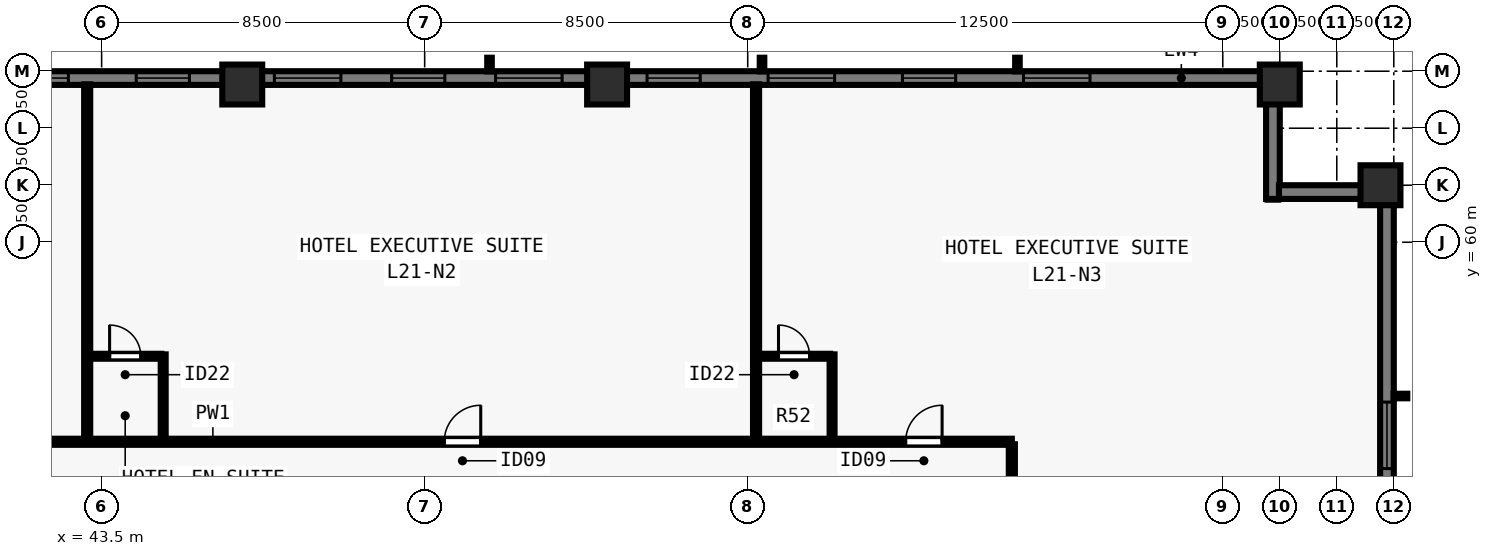
"""IFC4 building model, lengths in metres.
Left out: names, types, materials, properties, quantities, classifications, styles, units other than length and angle.
Written with IfcOpenShell. Run it as: python <this file> out.ifc"""

import sys

from ifc_helpers import new_model, si_unit, direction, frame, frame_2d, origin, origin_2d, place, context, subcontext, project, spatial, rectangle, extrude, element, fill, save


model = new_model("IFC4")
c1 = context("Model", 3, precision=1e-05, world=origin(), true_north=direction((0.0, 1.0)))
c2 = subcontext(c1, "Body", "Model", "MODEL_VIEW")
j1 = project(units=[si_unit("LENGTHUNIT", "METRE"), si_unit("PLANEANGLEUNIT", "RADIAN")], contexts=[c1])
p1 = place(None, origin())
s1 = spatial("IfcSite", under=j1, at=p1, CompositionType="ELEMENT")
p2 = place(p1, origin())
s2 = spatial("IfcBuilding", under=s1, at=p2, CompositionType="ELEMENT")
p3 = place(p2, frame((0.0, 0.0, 79.5)))
s3 = spatial("IfcBuildingStorey", under=s2, at=p3, CompositionType="ELEMENT", Elevation=79.5)
for number, where, z_axis, x_axis in (
    (1, (77.15, 61.5, 0.0), (0.0, 0.0, 1.0), (0.0, 1.0, 0.0)),
    (2, (74.5, 64.15, 0.0), (0.0, 0.0, 1.0), (1.0, 0.0, 0.0)),
    (3, (56.8, 64.15, 0.0), (0.0, 0.0, 1.0), (1.0, 0.0, 0.0)),
    (4, (47.2, 64.15, 0.0), (0.0, 0.0, 1.0), (1.0, 0.0, 0.0)),
):
    element("IfcColumn", number, at=place(p3, frame(where, z_axis=z_axis, x_axis=x_axis)), inside=s3, PredefinedType="COLUMN", context=c2, shape_type="SweptSolid", body=[
        extrude(rectangle(XDim=1.05, YDim=1.05, at=origin_2d()), origin(), (0.0, 0.0, 1.0), 3.5),
    ])
p4 = place(p3, frame((29.5, 64.32, 0.0), z_axis=(0.0, 0.0, 1.0), x_axis=(1.0, 0.0, 0.0)))
e5 = element("IfcWall", 5, at=p4, inside=s3, PredefinedType="SOLIDWALL", context=c2, shape_type="SweptSolid", body=[
    extrude(rectangle(XDim=44.662, YDim=0.36, at=frame_2d((22.331, 0.0))), origin(), (0.0, 0.0, 1.0), 3.28),
])
p5 = place(p4, frame((4.655, 0.0, 0.8)))
e6 = element("IfcOpeningElement", 6, at=p5, cuts=e5, PredefinedType="OPENING", context=c2, shape_type="SweptSolid", body=[
    extrude(rectangle(XDim=1.75, YDim=1.544, at=frame_2d((0.875, 0.772))), frame((0.0, 0.19, 0.0), z_axis=(0.0, -1.0, 0.0), x_axis=(1.0, 0.0, 0.0)), (0.0, 0.0, 1.0), 0.38),
])
p6 = place(p4, frame((8.19, 0.0, 0.8)))
e7 = element("IfcOpeningElement", 7, at=p6, cuts=e5, PredefinedType="OPENING", context=c2, shape_type="SweptSolid", body=[
    extrude(rectangle(XDim=1.4, YDim=1.544, at=frame_2d((0.7, 0.772))), frame((0.0, 0.19, 0.0), z_axis=(0.0, -1.0, 0.0), x_axis=(1.0, 0.0, 0.0)), (0.0, 0.0, 1.0), 0.38),
])
p7 = place(p4, frame((11.375, 0.0, 0.8)))
e8 = element("IfcOpeningElement", 8, at=p7, cuts=e5, PredefinedType="OPENING", context=c2, shape_type="SweptSolid", body=[
    extrude(rectangle(XDim=1.75, YDim=1.544, at=frame_2d((0.875, 0.772))), frame((0.0, 0.19, 0.0), z_axis=(0.0, -1.0, 0.0), x_axis=(1.0, 0.0, 0.0)), (0.0, 0.0, 1.0), 0.38),
])
p8 = place(p4, frame((14.911, 0.0, 0.8)))
e9 = element("IfcOpeningElement", 9, at=p8, cuts=e5, PredefinedType="OPENING", context=c2, shape_type="SweptSolid", body=[
    extrude(rectangle(XDim=1.4, YDim=1.544, at=frame_2d((0.7, 0.772))), frame((0.0, 0.19, 0.0), z_axis=(0.0, -1.0, 0.0), x_axis=(1.0, 0.0, 0.0)), (0.0, 0.0, 1.0), 0.38),
])
p9 = place(p4, frame((18.546, 0.0, 0.8)))
e10 = element("IfcOpeningElement", 10, at=p9, cuts=e5, PredefinedType="OPENING", context=c2, shape_type="SweptSolid", body=[
    extrude(rectangle(XDim=1.75, YDim=1.544, at=frame_2d((0.875, 0.772))), frame((0.0, 0.19, 0.0), z_axis=(0.0, -1.0, 0.0), x_axis=(1.0, 0.0, 0.0)), (0.0, 0.0, 1.0), 0.38),
])
p10 = place(p4, frame((21.631, 0.0, 0.8)))
e11 = element("IfcOpeningElement", 11, at=p10, cuts=e5, PredefinedType="OPENING", context=c2, shape_type="SweptSolid", body=[
    extrude(rectangle(XDim=1.4, YDim=1.544, at=frame_2d((0.7, 0.772))), frame((0.0, 0.19, 0.0), z_axis=(0.0, -1.0, 0.0), x_axis=(1.0, 0.0, 0.0)), (0.0, 0.0, 1.0), 0.38),
])
p11 = place(p4, frame((24.366, 0.0, 0.8)))
e12 = element("IfcOpeningElement", 12, at=p11, cuts=e5, PredefinedType="OPENING", context=c2, shape_type="SweptSolid", body=[
    extrude(rectangle(XDim=1.75, YDim=1.544, at=frame_2d((0.875, 0.772))), frame((0.0, 0.19, 0.0), z_axis=(0.0, -1.0, 0.0), x_axis=(1.0, 0.0, 0.0)), (0.0, 0.0, 1.0), 0.38),
])
p12 = place(p4, frame((28.351, 0.0, 0.8)))
e13 = element("IfcOpeningElement", 13, at=p12, cuts=e5, PredefinedType="OPENING", context=c2, shape_type="SweptSolid", body=[
    extrude(rectangle(XDim=1.4, YDim=1.544, at=frame_2d((0.7, 0.772))), frame((0.0, 0.19, 0.0), z_axis=(0.0, -1.0, 0.0), x_axis=(1.0, 0.0, 0.0)), (0.0, 0.0, 1.0), 0.38),
])
p13 = place(p4, frame((31.537, 0.0, 0.8)))
e14 = element("IfcOpeningElement", 14, at=p13, cuts=e5, PredefinedType="OPENING", context=c2, shape_type="SweptSolid", body=[
    extrude(rectangle(XDim=1.75, YDim=1.544, at=frame_2d((0.875, 0.772))), frame((0.0, 0.19, 0.0), z_axis=(0.0, -1.0, 0.0), x_axis=(1.0, 0.0, 0.0)), (0.0, 0.0, 1.0), 0.38),
])
p14 = place(p4, frame((35.072, 0.0, 0.8)))
e15 = element("IfcOpeningElement", 15, at=p14, cuts=e5, PredefinedType="OPENING", context=c2, shape_type="SweptSolid", body=[
    extrude(rectangle(XDim=1.4, YDim=1.544, at=frame_2d((0.7, 0.772))), frame((0.0, 0.19, 0.0), z_axis=(0.0, -1.0, 0.0), x_axis=(1.0, 0.0, 0.0)), (0.0, 0.0, 1.0), 0.38),
])
p15 = place(p4, frame((38.257, 0.0, 0.8)))
e16 = element("IfcOpeningElement", 16, at=p15, cuts=e5, PredefinedType="OPENING", context=c2, shape_type="SweptSolid", body=[
    extrude(rectangle(XDim=1.75, YDim=1.544, at=frame_2d((0.875, 0.772))), frame((0.0, 0.19, 0.0), z_axis=(0.0, -1.0, 0.0), x_axis=(1.0, 0.0, 0.0)), (0.0, 0.0, 1.0), 0.38),
])
p16 = place(p3, frame((74.32, 64.5, 0.0), z_axis=(0.0, 0.0, 1.0), x_axis=(0.0, -1.0, 0.0)))
e17 = element("IfcWall", 17, at=p16, inside=s3, PredefinedType="SOLIDWALL", context=c2, shape_type="SweptSolid", body=[
    extrude(rectangle(XDim=3.36, YDim=0.36, at=frame_2d((1.68, 0.0))), origin(), (0.0, 0.0, 1.0), 3.28),
])
p17 = place(p3, frame((74.478, 61.32, 0.0), z_axis=(0.0, 0.0, 1.0), x_axis=(1.0, 0.0, 0.0)))
e18 = element("IfcWall", 18, at=p17, inside=s3, PredefinedType="SOLIDWALL", context=c2, shape_type="SweptSolid", body=[
    extrude(rectangle(XDim=2.684, YDim=0.36, at=frame_2d((1.342, 0.0))), origin(), (0.0, 0.0, 1.0), 3.28),
])
p18 = place(p3, frame((77.32, 61.5, 0.0), z_axis=(0.0, 0.0, 1.0), x_axis=(0.0, -1.0, 0.0)))
e19 = element("IfcWall", 19, at=p18, inside=s3, PredefinedType="SOLIDWALL", context=c2, shape_type="SweptSolid", body=[
    extrude(rectangle(XDim=10.562, YDim=0.36, at=frame_2d((5.281, 0.0))), origin(), (0.0, 0.0, 1.0), 3.28),
])
p19 = place(p18, frame((5.706, 0.0, 0.8)))
e20 = element("IfcOpeningElement", 20, at=p19, cuts=e19, PredefinedType="OPENING", context=c2, shape_type="SweptSolid", body=[
    extrude(rectangle(XDim=1.75, YDim=1.544, at=frame_2d((0.875, 0.772))), frame((0.0, 0.19, 0.0), z_axis=(0.0, -1.0, 0.0), x_axis=(1.0, 0.0, 0.0)), (0.0, 0.0, 1.0), 0.38),
])
p20 = place(p3, frame((36.55, 54.75, 0.0), z_axis=(0.0, 0.0, 1.0), x_axis=(1.0, 0.0, 0.0)))
e21 = element("IfcWall", 21, at=p20, inside=s3, PredefinedType="PARTITIONING", context=c2, shape_type="SweptSolid", body=[
    extrude(rectangle(XDim=30.9, YDim=0.16, at=frame_2d((15.45, 0.0))), origin(), (0.0, 0.0, 1.0), 3.28),
])
p21 = place(p20, frame((2.83, 0.0, 0.0)))
e22 = element("IfcOpeningElement", 22, at=p21, cuts=e21, PredefinedType="OPENING", context=c2, shape_type="SweptSolid", body=[
    extrude(rectangle(XDim=0.96, YDim=2.15, at=frame_2d((0.48, 1.075))), frame((0.0, 0.09, 0.0), z_axis=(0.0, -1.0, 0.0), x_axis=(1.0, 0.0, 0.0)), (0.0, 0.0, 1.0), 0.18),
])
p22 = place(p20, frame((15.965, 0.0, 0.0)))
e23 = element("IfcOpeningElement", 23, at=p22, cuts=e21, PredefinedType="OPENING", context=c2, shape_type="SweptSolid", body=[
    extrude(rectangle(XDim=0.96, YDim=2.15, at=frame_2d((0.48, 1.075))), frame((0.0, 0.09, 0.0), z_axis=(0.0, -1.0, 0.0), x_axis=(1.0, 0.0, 0.0)), (0.0, 0.0, 1.0), 0.18),
])
p23 = place(p20, frame((28.105, 0.0, 0.0)))
e24 = element("IfcOpeningElement", 24, at=p23, cuts=e21, PredefinedType="OPENING", context=c2, shape_type="SweptSolid", body=[
    extrude(rectangle(XDim=0.96, YDim=2.15, at=frame_2d((0.48, 1.075))), frame((0.0, 0.09, 0.0), z_axis=(0.0, -1.0, 0.0), x_axis=(1.0, 0.0, 0.0)), (0.0, 0.0, 1.0), 0.18),
])
p24 = place(p3, frame((67.45, 23.315, 0.0), z_axis=(0.0, 0.0, 1.0), x_axis=(0.0, 1.0, 0.0)))
e25 = element("IfcWall", 25, at=p24, inside=s3, PredefinedType="PARTITIONING", context=c2, shape_type="SweptSolid", body=[
    extrude(rectangle(XDim=31.37, YDim=0.16, at=frame_2d((15.685, 0.0))), origin(), (0.0, 0.0, 1.0), 3.28),
])
p25 = place(p24, frame((8.474, 0.0, 0.0)))
e26 = element("IfcOpeningElement", 26, at=p25, cuts=e25, PredefinedType="OPENING", context=c2, shape_type="SweptSolid", body=[
    extrude(rectangle(XDim=0.96, YDim=2.15, at=frame_2d((0.48, 1.075))), frame((0.0, 0.09, 0.0), z_axis=(0.0, -1.0, 0.0), x_axis=(1.0, 0.0, 0.0)), (0.0, 0.0, 1.0), 0.18),
])
p26 = place(p24, frame((23.974, 0.0, 0.0)))
e27 = element("IfcOpeningElement", 27, at=p26, cuts=e25, PredefinedType="OPENING", context=c2, shape_type="SweptSolid", body=[
    extrude(rectangle(XDim=0.96, YDim=2.15, at=frame_2d((0.48, 1.075))), frame((0.0, 0.09, 0.0), z_axis=(0.0, -1.0, 0.0), x_axis=(1.0, 0.0, 0.0)), (0.0, 0.0, 1.0), 0.18),
])
p27 = place(p3, frame((43.12, 54.815, 0.0), z_axis=(0.0, 0.0, 1.0), x_axis=(0.0, 1.0, 0.0)))
e28 = element("IfcWall", 28, at=p27, inside=s3, PredefinedType="PARTITIONING", context=c2, shape_type="SweptSolid", body=[
    extrude(rectangle(XDim=9.34, YDim=0.16, at=frame_2d((4.67, 0.0))), origin(), (0.0, 0.0, 1.0), 3.28),
])
p28 = place(p3, frame((45.12, 54.815, 0.0), z_axis=(0.0, 0.0, 1.0), x_axis=(0.0, 1.0, 0.0)))
e29 = element("IfcWall", 29, at=p28, inside=s3, PredefinedType="PLUMBINGWALL", context=c2, shape_type="SweptSolid", body=[
    extrude(rectangle(XDim=2.235, YDim=0.13, at=frame_2d((1.118, 0.0))), origin(), (0.0, 0.0, 1.0), 3.28),
])
p29 = place(p3, frame((43.185, 57.0, 0.0), z_axis=(0.0, 0.0, 1.0), x_axis=(1.0, 0.0, 0.0)))
e30 = element("IfcWall", 30, at=p29, inside=s3, PredefinedType="PLUMBINGWALL", context=c2, shape_type="SweptSolid", body=[
    extrude(rectangle(XDim=1.885, YDim=0.13, at=frame_2d((0.942, 0.0))), origin(), (0.0, 0.0, 1.0), 3.28),
])
p30 = place(p29, frame((0.525, 0.0, 0.0)))
e31 = element("IfcOpeningElement", 31, at=p30, cuts=e30, PredefinedType="OPENING", context=c2, shape_type="SweptSolid", body=[
    extrude(rectangle(XDim=0.82, YDim=2.1, at=frame_2d((0.41, 1.05))), frame((0.0, 0.075, 0.0), z_axis=(0.0, -1.0, 0.0), x_axis=(1.0, 0.0, 0.0)), (0.0, 0.0, 1.0), 0.15),
])
p31 = place(p3, frame((60.72, 54.815, 0.0), z_axis=(0.0, 0.0, 1.0), x_axis=(0.0, 1.0, 0.0)))
e32 = element("IfcWall", 32, at=p31, inside=s3, PredefinedType="PARTITIONING", context=c2, shape_type="SweptSolid", body=[
    extrude(rectangle(XDim=9.34, YDim=0.16, at=frame_2d((4.67, 0.0))), origin(), (0.0, 0.0, 1.0), 3.28),
])
p32 = place(p3, frame((62.72, 54.815, 0.0), z_axis=(0.0, 0.0, 1.0), x_axis=(0.0, 1.0, 0.0)))
e33 = element("IfcWall", 33, at=p32, inside=s3, PredefinedType="PLUMBINGWALL", context=c2, shape_type="SweptSolid", body=[
    extrude(rectangle(XDim=2.235, YDim=0.13, at=frame_2d((1.118, 0.0))), origin(), (0.0, 0.0, 1.0), 3.28),
])
p33 = place(p3, frame((60.785, 57.0, 0.0), z_axis=(0.0, 0.0, 1.0), x_axis=(1.0, 0.0, 0.0)))
e34 = element("IfcWall", 34, at=p33, inside=s3, PredefinedType="PLUMBINGWALL", context=c2, shape_type="SweptSolid", body=[
    extrude(rectangle(XDim=1.885, YDim=0.13, at=frame_2d((0.942, 0.0))), origin(), (0.0, 0.0, 1.0), 3.28),
])
p34 = place(p33, frame((0.525, 0.0, 0.0)))
e35 = element("IfcOpeningElement", 35, at=p34, cuts=e34, PredefinedType="OPENING", context=c2, shape_type="SweptSolid", body=[
    extrude(rectangle(XDim=0.82, YDim=2.1, at=frame_2d((0.41, 1.05))), frame((0.0, 0.075, 0.0), z_axis=(0.0, -1.0, 0.0), x_axis=(1.0, 0.0, 0.0)), (0.0, 0.0, 1.0), 0.15),
])
p35 = place(p7, origin())
e36 = element("IfcWindow", 36, at=p35, inside=s3, PartitioningType="SINGLE_PANEL", PredefinedType="WINDOW", context=c2, shape_type="SweptSolid", body=[
    extrude(rectangle(XDim=1.75, YDim=1.544, at=frame_2d((0.875, 0.772))), frame((0.0, -0.05, 0.0), z_axis=(0.0, -1.0, 0.0), x_axis=(1.0, 0.0, 0.0)), (0.0, 0.0, 1.0), 0.06),
])
fill(e8, e36)
p36 = place(p8, origin())
e37 = element("IfcWindow", 37, at=p36, inside=s3, PartitioningType="SINGLE_PANEL", PredefinedType="WINDOW", context=c2, shape_type="SweptSolid", body=[
    extrude(rectangle(XDim=1.4, YDim=1.544, at=frame_2d((0.7, 0.772))), frame((0.0, -0.05, 0.0), z_axis=(0.0, -1.0, 0.0), x_axis=(1.0, 0.0, 0.0)), (0.0, 0.0, 1.0), 0.06),
])
fill(e9, e37)
p37 = place(p9, origin())
e38 = element("IfcWindow", 38, at=p37, inside=s3, PartitioningType="SINGLE_PANEL", PredefinedType="WINDOW", context=c2, shape_type="SweptSolid", body=[
    extrude(rectangle(XDim=1.75, YDim=1.544, at=frame_2d((0.875, 0.772))), frame((0.0, -0.05, 0.0), z_axis=(0.0, -1.0, 0.0), x_axis=(1.0, 0.0, 0.0)), (0.0, 0.0, 1.0), 0.06),
])
fill(e10, e38)
p38 = place(p10, origin())
e39 = element("IfcWindow", 39, at=p38, inside=s3, PartitioningType="SINGLE_PANEL", PredefinedType="WINDOW", context=c2, shape_type="SweptSolid", body=[
    extrude(rectangle(XDim=1.4, YDim=1.544, at=frame_2d((0.7, 0.772))), frame((0.0, -0.05, 0.0), z_axis=(0.0, -1.0, 0.0), x_axis=(1.0, 0.0, 0.0)), (0.0, 0.0, 1.0), 0.06),
])
fill(e11, e39)
p39 = place(p11, origin())
e40 = element("IfcWindow", 40, at=p39, inside=s3, PartitioningType="SINGLE_PANEL", PredefinedType="WINDOW", context=c2, shape_type="SweptSolid", body=[
    extrude(rectangle(XDim=1.75, YDim=1.544, at=frame_2d((0.875, 0.772))), frame((0.0, -0.05, 0.0), z_axis=(0.0, -1.0, 0.0), x_axis=(1.0, 0.0, 0.0)), (0.0, 0.0, 1.0), 0.06),
])
fill(e12, e40)
p40 = place(p12, origin())
e41 = element("IfcWindow", 41, at=p40, inside=s3, PartitioningType="SINGLE_PANEL", PredefinedType="WINDOW", context=c2, shape_type="SweptSolid", body=[
    extrude(rectangle(XDim=1.4, YDim=1.544, at=frame_2d((0.7, 0.772))), frame((0.0, -0.05, 0.0), z_axis=(0.0, -1.0, 0.0), x_axis=(1.0, 0.0, 0.0)), (0.0, 0.0, 1.0), 0.06),
])
fill(e13, e41)
p41 = place(p13, origin())
e42 = element("IfcWindow", 42, at=p41, inside=s3, PartitioningType="SINGLE_PANEL", PredefinedType="WINDOW", context=c2, shape_type="SweptSolid", body=[
    extrude(rectangle(XDim=1.75, YDim=1.544, at=frame_2d((0.875, 0.772))), frame((0.0, -0.05, 0.0), z_axis=(0.0, -1.0, 0.0), x_axis=(1.0, 0.0, 0.0)), (0.0, 0.0, 1.0), 0.06),
])
fill(e14, e42)
p42 = place(p14, origin())
e43 = element("IfcWindow", 43, at=p42, inside=s3, PartitioningType="SINGLE_PANEL", PredefinedType="WINDOW", context=c2, shape_type="SweptSolid", body=[
    extrude(rectangle(XDim=1.4, YDim=1.544, at=frame_2d((0.7, 0.772))), frame((0.0, -0.05, 0.0), z_axis=(0.0, -1.0, 0.0), x_axis=(1.0, 0.0, 0.0)), (0.0, 0.0, 1.0), 0.06),
])
fill(e15, e43)
p43 = place(p15, origin())
e44 = element("IfcWindow", 44, at=p43, inside=s3, PartitioningType="SINGLE_PANEL", PredefinedType="WINDOW", context=c2, shape_type="SweptSolid", body=[
    extrude(rectangle(XDim=1.75, YDim=1.544, at=frame_2d((0.875, 0.772))), frame((0.0, -0.05, 0.0), z_axis=(0.0, -1.0, 0.0), x_axis=(1.0, 0.0, 0.0)), (0.0, 0.0, 1.0), 0.06),
])
fill(e16, e44)
p44 = place(p19, origin())
e45 = element("IfcWindow", 45, at=p44, inside=s3, PartitioningType="SINGLE_PANEL", PredefinedType="WINDOW", context=c2, shape_type="SweptSolid", body=[
    extrude(rectangle(XDim=1.75, YDim=1.544, at=frame_2d((0.875, 0.772))), frame((0.0, -0.05, 0.0), z_axis=(0.0, -1.0, 0.0), x_axis=(1.0, 0.0, 0.0)), (0.0, 0.0, 1.0), 0.06),
])
fill(e20, e45)
p45 = place(p30, origin())
e46 = element("IfcDoor", 46, at=p45, inside=s3, OperationType="SINGLE_SWING_LEFT", PredefinedType="DOOR", context=c2, shape_type="SweptSolid", body=[
    extrude(rectangle(XDim=0.82, YDim=2.1, at=frame_2d((0.41, 1.05))), frame((0.0, 0.025, 0.0), z_axis=(0.0, -1.0, 0.0), x_axis=(1.0, 0.0, 0.0)), (0.0, 0.0, 1.0), 0.05),
])
fill(e31, e46)
p46 = place(p22, origin())
e47 = element("IfcDoor", 47, at=p46, inside=s3, OperationType="SINGLE_SWING_RIGHT", PredefinedType="DOOR", context=c2, shape_type="SweptSolid", body=[
    extrude(rectangle(XDim=0.96, YDim=2.15, at=frame_2d((0.48, 1.075))), frame((0.0, 0.025, 0.0), z_axis=(0.0, -1.0, 0.0), x_axis=(1.0, 0.0, 0.0)), (0.0, 0.0, 1.0), 0.05),
])
fill(e23, e47)
p47 = place(p34, origin())
e48 = element("IfcDoor", 48, at=p47, inside=s3, OperationType="SINGLE_SWING_LEFT", PredefinedType="DOOR", context=c2, shape_type="SweptSolid", body=[
    extrude(rectangle(XDim=0.82, YDim=2.1, at=frame_2d((0.41, 1.05))), frame((0.0, 0.025, 0.0), z_axis=(0.0, -1.0, 0.0), x_axis=(1.0, 0.0, 0.0)), (0.0, 0.0, 1.0), 0.05),
])
fill(e35, e48)
p48 = place(p23, origin())
e49 = element("IfcDoor", 49, at=p48, inside=s3, OperationType="SINGLE_SWING_RIGHT", PredefinedType="DOOR", context=c2, shape_type="SweptSolid", body=[
    extrude(rectangle(XDim=0.96, YDim=2.15, at=frame_2d((0.48, 1.075))), frame((0.0, 0.025, 0.0), z_axis=(0.0, -1.0, 0.0), x_axis=(1.0, 0.0, 0.0)), (0.0, 0.0, 1.0), 0.05),
])
fill(e24, e49)
save(model, sys.argv[1])
